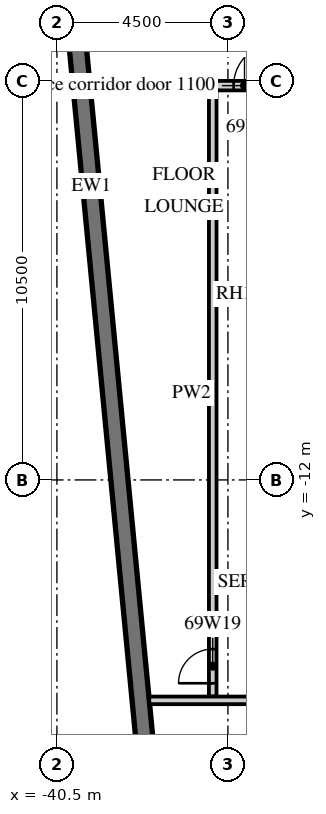
"""IFC4 building model, lengths in metres.
Left out: names, types, materials, properties, quantities, classifications, styles, units other than length and angle.
Written with IfcOpenShell. Run it as: python <this file> out.ifc"""

import sys

from ifc_helpers import new_model, si_unit, direction, frame, frame_2d, origin, place, context, subcontext, project, spatial, rectangle, extrude, element, fill, save


model = new_model("IFC4")
c1 = context("Model", 3, precision=1e-05, world=origin(), true_north=direction((0.0, 1.0)))
c2 = subcontext(c1, "Body", "Model", "MODEL_VIEW")
j1 = project(units=[si_unit("LENGTHUNIT", "METRE"), si_unit("PLANEANGLEUNIT", "RADIAN")], contexts=[c1])
p1 = place(None, origin())
s1 = spatial("IfcSite", under=j1, at=p1, CompositionType="ELEMENT")
p2 = place(p1, origin())
s2 = spatial("IfcBuilding", under=s1, at=p2, CompositionType="ELEMENT")
p3 = place(p2, frame((0.0, 0.0, 278.4)))
s3 = spatial("IfcBuildingStorey", under=s2, at=p3, CompositionType="ELEMENT", Elevation=278.4)
p4 = place(p3, frame((-41.132, 11.658, 0.0), z_axis=(0.0, 0.0, 1.0), x_axis=(0.095847749461, -0.995396006082, 0.0)))
e1 = element("IfcWall", 1, at=p4, inside=s3, PredefinedType="SOLIDWALL", context=c2, shape_type="SweptSolid", body=[
    extrude(rectangle(XDim=32.0, YDim=0.45, at=frame_2d((16.0, 0.0))), origin(), (0.0, 0.0, 1.0), 3.02),
])
p5 = place(p4, frame((2.053, 0.0, 0.45)))
e2 = element("IfcOpeningElement", 2, at=p5, cuts=e1, PredefinedType="OPENING", context=c2, shape_type="SweptSolid", body=[
    extrude(rectangle(XDim=3.3, YDim=2.25, at=frame_2d((1.65, 1.125))), frame((0.0, 0.235, 0.0), z_axis=(0.0, -1.0, 0.0), x_axis=(1.0, 0.0, 0.0)), (0.0, 0.0, 1.0), 0.47),
])
p6 = place(p4, frame((6.574, 0.0, 0.45)))
e3 = element("IfcOpeningElement", 3, at=p6, cuts=e1, PredefinedType="OPENING", context=c2, shape_type="SweptSolid", body=[
    extrude(rectangle(XDim=3.3, YDim=2.25, at=frame_2d((1.65, 1.125))), frame((0.0, 0.235, 0.0), z_axis=(0.0, -1.0, 0.0), x_axis=(1.0, 0.0, 0.0)), (0.0, 0.0, 1.0), 0.47),
])
p7 = place(p3, frame((-39.627, -1.625, 0.0), z_axis=(0.0, 0.0, 1.0), x_axis=(1.0, 0.0, 0.0)))
e4 = element("IfcWall", 4, at=p7, inside=s3, PredefinedType="PARTITIONING", context=c2, shape_type="SweptSolid", body=[
    extrude(rectangle(XDim=8.127, YDim=0.25, at=frame_2d((4.063, 0.0))), origin(), (0.0, 0.0, 1.0), 3.02),
])
p8 = place(p7, frame((6.202, 0.0, 0.0)))
e5 = element("IfcOpeningElement", 5, at=p8, cuts=e4, PredefinedType="OPENING", context=c2, shape_type="SweptSolid", body=[
    extrude(rectangle(XDim=1.3, YDim=2.1, at=frame_2d((0.65, 1.05))), frame((0.0, 0.135, 0.0), z_axis=(0.0, -1.0, 0.0), x_axis=(1.0, 0.0, 0.0)), (0.0, 0.0, 1.0), 0.27),
])
p9 = place(p7, frame((3.777, 0.0, 0.0)))
e6 = element("IfcOpeningElement", 6, at=p9, cuts=e4, PredefinedType="OPENING", context=c2, shape_type="SweptSolid", body=[
    extrude(rectangle(XDim=1.1, YDim=2.1, at=frame_2d((0.55, 1.05))), frame((0.0, 0.135, 0.0), z_axis=(0.0, -1.0, 0.0), x_axis=(1.0, 0.0, 0.0)), (0.0, 0.0, 1.0), 0.27),
])
p10 = place(p3, frame((-36.4, -17.7, 0.0), z_axis=(0.0, 0.0, 1.0), x_axis=(0.0, 1.0, 0.0)))
e7 = element("IfcWall", 7, at=p10, inside=s3, PredefinedType="PARTITIONING", context=c2, shape_type="SweptSolid", body=[
    extrude(rectangle(XDim=15.95, YDim=0.2, at=frame_2d((7.975, 0.0))), origin(), (0.0, 0.0, 1.0), 3.02),
])
p11 = place(p10, frame((0.35, 0.0, 0.0)))
e8 = element("IfcOpeningElement", 8, at=p11, cuts=e7, PredefinedType="OPENING", context=c2, shape_type="SweptSolid", body=[
    extrude(rectangle(XDim=0.9, YDim=2.1, at=frame_2d((0.45, 1.05))), frame((0.0, 0.11, 0.0), z_axis=(0.0, -1.0, 0.0), x_axis=(1.0, 0.0, 0.0)), (0.0, 0.0, 1.0), 0.22),
])
p12 = place(p3, frame((-38.07, -17.8, 0.0), z_axis=(0.0, 0.0, 1.0), x_axis=(1.0, 0.0, 0.0)))
e9 = element("IfcWall", 9, at=p12, inside=s3, PredefinedType="PARTITIONING", context=c2, shape_type="SweptSolid", body=[
    extrude(rectangle(XDim=24.47, YDim=0.2, at=frame_2d((12.235, 0.0))), origin(), (0.0, 0.0, 1.0), 3.02),
])
p13 = place(p12, frame((8.557, 0.0, 0.0)))
e10 = element("IfcOpeningElement", 10, at=p13, cuts=e9, PredefinedType="OPENING", context=c2, shape_type="SweptSolid", body=[
    extrude(rectangle(XDim=0.9, YDim=2.1, at=frame_2d((0.45, 1.05))), frame((0.0, 0.11, 0.0), z_axis=(0.0, -1.0, 0.0), x_axis=(1.0, 0.0, 0.0)), (0.0, 0.0, 1.0), 0.22),
])
p14 = place(p12, frame((16.857, 0.0, 0.0)))
e11 = element("IfcOpeningElement", 11, at=p14, cuts=e9, PredefinedType="OPENING", context=c2, shape_type="SweptSolid", body=[
    extrude(rectangle(XDim=0.9, YDim=2.1, at=frame_2d((0.45, 1.05))), frame((0.0, 0.11, 0.0), z_axis=(0.0, -1.0, 0.0), x_axis=(1.0, 0.0, 0.0)), (0.0, 0.0, 1.0), 0.22),
])
p15 = place(p9, origin())
e12 = element("IfcDoor", 12, at=p15, inside=s3, OperationType="SINGLE_SWING_RIGHT", PredefinedType="DOOR", context=c2, shape_type="SweptSolid", body=[
    extrude(rectangle(XDim=1.1, YDim=2.1, at=frame_2d((0.55, 1.05))), frame((0.0, 0.025, 0.0), z_axis=(0.0, -1.0, 0.0), x_axis=(1.0, 0.0, 0.0)), (0.0, 0.0, 1.0), 0.05),
])
fill(e6, e12)
p16 = place(p11, origin())
e13 = element("IfcDoor", 13, at=p16, inside=s3, OperationType="SINGLE_SWING_LEFT", PredefinedType="DOOR", context=c2, shape_type="SweptSolid", body=[
    extrude(rectangle(XDim=0.9, YDim=2.1, at=frame_2d((0.45, 1.05))), frame((0.0, 0.025, 0.0), z_axis=(0.0, -1.0, 0.0), x_axis=(1.0, 0.0, 0.0)), (0.0, 0.0, 1.0), 0.05),
])
fill(e8, e13)
save(model, sys.argv[1])
